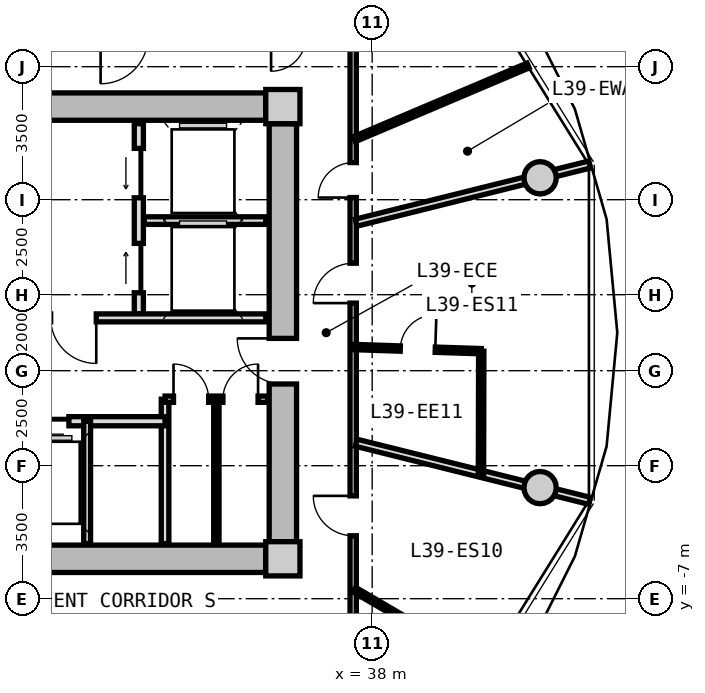
"""IFC4 building model, lengths in metres.
Left out: names, types, materials, properties, quantities, classifications, styles, units other than length and angle.
Written with IfcOpenShell. Run it as: python <this file> out.ifc"""

import sys

from ifc_helpers import new_model, si_unit, direction, frame, frame_2d, origin, origin_2d, place, context, subcontext, project, spatial, rectangle, circle, extrude, source, transform, mapped, element, fill, save


model = new_model("IFC4")
c1 = context("Model", 3, precision=1e-05, world=origin(), true_north=direction((0.0, 1.0)))
c2 = subcontext(c1, "Body", "Model", "MODEL_VIEW")
j1 = project(units=[si_unit("LENGTHUNIT", "METRE"), si_unit("PLANEANGLEUNIT", "RADIAN")], contexts=[c1])
p1 = place(None, origin())
s1 = spatial("IfcSite", under=j1, at=p1, CompositionType="ELEMENT")
p2 = place(p1, origin())
s2 = spatial("IfcBuilding", under=s1, at=p2, CompositionType="ELEMENT")
p3 = place(p2, frame((0.0, 0.0, 126.75)))
s3 = spatial("IfcBuildingStorey", under=s2, at=p3, CompositionType="ELEMENT", Elevation=126.75)
m1 = source(origin(), c2, "Body", "SweptSolid", [
    extrude(rectangle(XDim=0.9, YDim=0.9, at=origin_2d()), origin(), (0.0, 0.0, 1.0), 3.05),
])
for number, where, z_axis, x_axis in (
    (1, (35.65, -5.95, 0.0), (0.0, 0.0, 1.0), (1.0, 0.0, 0.0)),
    (2, (35.65, 5.95, 0.0), (0.0, 0.0, 1.0), (1.0, 0.0, 0.0)),
):
    element("IfcColumn", number, at=place(p3, frame(where, z_axis=z_axis, x_axis=x_axis)), inside=s3, PredefinedType="COLUMN", context=c2, shape_type="MappedRepresentation", body=[
        mapped(m1, transform((0.0, 0.0, 0.0), x_axis=(1.0, 0.0, 0.0), y_axis=(0.0, 1.0, 0.0), z_axis=(0.0, 0.0, 1.0), scale=1.0)),
    ])
m2 = source(origin(), c2, "Body", "SweptSolid", [
    extrude(rectangle(XDim=14.4, YDim=0.72, at=frame_2d((7.2, 0.0))), origin(), (0.0, 0.0, 1.0), 2.73),
])
for number, where, z_axis, x_axis in (
    (3, (20.8, 5.95, 0.0), (0.0, 0.0, 1.0), (1.0, 0.0, 0.0)),
    (4, (35.2, -5.95, 0.0), (0.0, 0.0, 1.0), (-1.0, 0.0, 0.0)),
):
    element("IfcWall", number, at=place(p3, frame(where, z_axis=z_axis, x_axis=x_axis)), inside=s3, PredefinedType="SHEAR", context=c2, shape_type="MappedRepresentation", body=[
        mapped(m2, transform((0.0, 0.0, 0.0), x_axis=(1.0, 0.0, 0.0), y_axis=(0.0, 1.0, 0.0), z_axis=(0.0, 0.0, 1.0), scale=1.0)),
    ])
m3 = source(origin(), c2, "Body", "SweptSolid", [
    extrude(rectangle(XDim=11.0, YDim=0.72, at=frame_2d((5.5, 0.0))), origin(), (0.0, 0.0, 1.0), 2.73),
])
p4 = place(p3, frame((35.65, 5.5, 0.0), z_axis=(0.0, 0.0, 1.0), x_axis=(0.0, -1.0, 0.0)))
e5 = element("IfcWall", 5, at=p4, inside=s3, PredefinedType="SHEAR", context=c2, shape_type="MappedRepresentation", body=[
    mapped(m3, transform((0.0, 0.0, 0.0), x_axis=(1.0, 0.0, 0.0), y_axis=(0.0, 1.0, 0.0), z_axis=(0.0, 0.0, 1.0), scale=1.0)),
])
p5 = place(p4, frame((5.65, 0.0, 0.0)))
e6 = element("IfcOpeningElement", 6, at=p5, cuts=e5, PredefinedType="OPENING", context=c2, shape_type="SweptSolid", body=[
    extrude(rectangle(XDim=1.2, YDim=2.15, at=frame_2d((0.6, 1.075))), frame((0.0, 0.37, 0.0), z_axis=(0.0, -1.0, 0.0), x_axis=(1.0, 0.0, 0.0)), (0.0, 0.0, 1.0), 0.74),
])
m4 = source(origin(), c2, "Body", "SweptSolid", [
    extrude(circle(Radius=0.425, at=origin_2d()), origin(), (0.0, 0.0, 1.0), 3.05),
])
for number, where, z_axis, x_axis in (
    (7, (42.419, 4.076, 0.0), (0.0, 0.0, 1.0), (1.0, 0.0, 0.0)),
    (8, (42.419, -4.076, 0.0), (0.0, 0.0, 1.0), (1.0, 0.0, 0.0)),
):
    element("IfcColumn", number, at=place(p3, frame(where, z_axis=z_axis, x_axis=x_axis)), inside=s3, PredefinedType="COLUMN", context=c2, shape_type="MappedRepresentation", body=[
        mapped(m4, transform((0.0, 0.0, 0.0), x_axis=(1.0, 0.0, 0.0), y_axis=(0.0, 1.0, 0.0), z_axis=(0.0, 0.0, 1.0), scale=1.0)),
    ])
m5 = source(origin(), c2, "Body", "SweptSolid", [
    extrude(rectangle(XDim=5.0, YDim=0.24, at=frame_2d((2.5, 0.0))), origin(), (0.0, 0.0, 1.0), 2.715),
])
p6 = place(p3, frame((31.86, 0.5, 0.0), z_axis=(0.0, 0.0, 1.0), x_axis=(0.0, 1.0, 0.0)))
e9 = element("IfcWall", 9, at=p6, inside=s3, PredefinedType="PARTITIONING", context=c2, shape_type="MappedRepresentation", body=[
    mapped(m5, transform((0.0, 0.0, 0.0), x_axis=(1.0, 0.0, 0.0), y_axis=(0.0, 1.0, 0.0), z_axis=(0.0, 0.0, 1.0), scale=1.0)),
])
p7 = place(p6, frame((3.05, 0.0, 0.0)))
e10 = element("IfcOpeningElement", 10, at=p7, cuts=e9, PredefinedType="OPENING", context=c2, shape_type="SweptSolid", body=[
    extrude(rectangle(XDim=1.3, YDim=2.2, at=frame_2d((0.65, 1.1))), frame((0.0, 0.13, 0.0), z_axis=(0.0, -1.0, 0.0), x_axis=(1.0, 0.0, 0.0)), (0.0, 0.0, 1.0), 0.26),
])
p8 = place(p6, frame((0.55, 0.0, 0.0)))
e11 = element("IfcOpeningElement", 11, at=p8, cuts=e9, PredefinedType="OPENING", context=c2, shape_type="SweptSolid", body=[
    extrude(rectangle(XDim=1.3, YDim=2.2, at=frame_2d((0.65, 1.1))), frame((0.0, 0.13, 0.0), z_axis=(0.0, -1.0, 0.0), x_axis=(1.0, 0.0, 0.0)), (0.0, 0.0, 1.0), 0.26),
])
m6 = source(origin(), c2, "Body", "SweptSolid", [
    extrude(rectangle(XDim=3.2, YDim=0.2, at=frame_2d((1.6, 0.0))), origin(), (0.0, 0.0, 1.0), 2.715),
])
p9 = place(p3, frame((32.0, 2.95, 0.0), z_axis=(0.0, 0.0, 1.0), x_axis=(1.0, 0.0, 0.0)))
e12 = element("IfcWall", 12, at=p9, inside=s3, PredefinedType="PARTITIONING", context=c2, shape_type="MappedRepresentation", body=[
    mapped(m6, transform((0.0, 0.0, 0.0), x_axis=(1.0, 0.0, 0.0), y_axis=(0.0, 1.0, 0.0), z_axis=(0.0, 0.0, 1.0), scale=1.0)),
])
m7 = source(origin(), c2, "Body", "SweptSolid", [
    extrude(rectangle(XDim=6.66, YDim=0.21, at=frame_2d((3.33, 0.0))), origin(), (0.0, 0.0, 1.0), 2.715),
])
p10 = place(p3, frame((28.54, 0.39, 0.0), z_axis=(0.0, 0.0, 1.0), x_axis=(1.0, 0.0, 0.0)))
e13 = element("IfcWall", 13, at=p10, inside=s3, PredefinedType="PARTITIONING", context=c2, shape_type="MappedRepresentation", body=[
    mapped(m7, transform((0.0, 0.0, 0.0), x_axis=(1.0, 0.0, 0.0), y_axis=(0.0, 1.0, 0.0), z_axis=(0.0, 0.0, 1.0), scale=1.0)),
])
p11 = place(p10, frame((1.0, 0.0, 0.0)))
e14 = element("IfcOpeningElement", 14, at=p11, cuts=e13, PredefinedType="OPENING", context=c2, shape_type="SweptSolid", body=[
    extrude(rectangle(XDim=1.2, YDim=2.15, at=frame_2d((0.6, 1.075))), frame((0.0, 0.115, 0.0), z_axis=(0.0, -1.0, 0.0), x_axis=(1.0, 0.0, 0.0)), (0.0, 0.0, 1.0), 0.23),
])
m8 = source(origin(), c2, "Body", "SweptSolid", [
    extrude(rectangle(XDim=3.8, YDim=0.2, at=frame_2d((1.9, 0.0))), origin(), (0.0, 0.0, 1.0), 2.715),
])
p12 = place(p3, frame((32.55, -5.55, 0.0), z_axis=(0.0, 0.0, 1.0), x_axis=(0.0, 1.0, 0.0)))
e15 = element("IfcWall", 15, at=p12, inside=s3, PredefinedType="PARTITIONING", context=c2, shape_type="MappedRepresentation", body=[
    mapped(m8, transform((0.0, 0.0, 0.0), x_axis=(1.0, 0.0, 0.0), y_axis=(0.0, 1.0, 0.0), z_axis=(0.0, 0.0, 1.0), scale=1.0)),
])
m9 = source(origin(), c2, "Body", "SweptSolid", [
    extrude(rectangle(XDim=4.13, YDim=0.24, at=frame_2d((2.065, 0.0))), origin(), (0.0, 0.0, 1.0), 2.715),
])
p13 = place(p3, frame((28.42, -2.33, 0.0), z_axis=(0.0, 0.0, 1.0), x_axis=(1.0, 0.0, 0.0)))
e16 = element("IfcWall", 16, at=p13, inside=s3, PredefinedType="PARTITIONING", context=c2, shape_type="MappedRepresentation", body=[
    mapped(m9, transform((0.0, 0.0, 0.0), x_axis=(1.0, 0.0, 0.0), y_axis=(0.0, 1.0, 0.0), z_axis=(0.0, 0.0, 1.0), scale=1.0)),
])
p14 = place(p13, frame((0.5, 0.0, 0.0)))
e17 = element("IfcOpeningElement", 17, at=p14, cuts=e16, PredefinedType="OPENING", context=c2, shape_type="SweptSolid", body=[
    extrude(rectangle(XDim=1.1, YDim=2.2, at=frame_2d((0.55, 1.1))), frame((0.0, 0.13, 0.0), z_axis=(0.0, -1.0, 0.0), x_axis=(1.0, 0.0, 0.0)), (0.0, 0.0, 1.0), 0.26),
])
m10 = source(origin(), c2, "Body", "SweptSolid", [
    extrude(rectangle(XDim=3.22, YDim=0.18, at=frame_2d((1.61, 0.0))), origin(), (0.0, 0.0, 1.0), 2.715),
])
p15 = place(p3, frame((30.5, -5.55, 0.0), z_axis=(0.0, 0.0, 1.0), x_axis=(0.0, 1.0, 0.0)))
e18 = element("IfcWall", 18, at=p15, inside=s3, PredefinedType="PARTITIONING", context=c2, shape_type="MappedRepresentation", body=[
    mapped(m10, transform((0.0, 0.0, 0.0), x_axis=(1.0, 0.0, 0.0), y_axis=(0.0, 1.0, 0.0), z_axis=(0.0, 0.0, 1.0), scale=1.0)),
])
m11 = source(origin(), c2, "Body", "SweptSolid", [
    extrude(rectangle(XDim=2.7, YDim=0.165, at=frame_2d((1.35, 0.0))), origin(), (0.0, 0.0, 1.0), 2.715),
])
p16 = place(p3, frame((32.55, -1.75, 0.0), z_axis=(0.0, 0.0, 1.0), x_axis=(1.0, 0.0, 0.0)))
e19 = element("IfcWall", 19, at=p16, inside=s3, PredefinedType="PARTITIONING", context=c2, shape_type="MappedRepresentation", body=[
    mapped(m11, transform((0.0, 0.0, 0.0), x_axis=(1.0, 0.0, 0.0), y_axis=(0.0, 1.0, 0.0), z_axis=(0.0, 0.0, 1.0), scale=1.0)),
])
p17 = place(p16, frame((0.222, 0.0, 0.0)))
e20 = element("IfcOpeningElement", 20, at=p17, cuts=e19, PredefinedType="OPENING", context=c2, shape_type="SweptSolid", body=[
    extrude(rectangle(XDim=0.925, YDim=2.1, at=frame_2d((0.462, 1.05))), frame((0.0, 0.093, 0.0), z_axis=(0.0, -1.0, 0.0), x_axis=(1.0, 0.0, 0.0)), (0.0, 0.0, 1.0), 0.185),
])
p18 = place(p16, frame((1.522, 0.0, 0.0)))
e21 = element("IfcOpeningElement", 21, at=p18, cuts=e19, PredefinedType="OPENING", context=c2, shape_type="SweptSolid", body=[
    extrude(rectangle(XDim=0.925, YDim=2.1, at=frame_2d((0.462, 1.05))), frame((0.0, 0.093, 0.0), z_axis=(0.0, -1.0, 0.0), x_axis=(1.0, 0.0, 0.0)), (0.0, 0.0, 1.0), 0.185),
])
m12 = source(origin(), c2, "Body", "SweptSolid", [
    extrude(rectangle(XDim=3.8, YDim=0.14, at=frame_2d((1.9, 0.0))), origin(), (0.0, 0.0, 1.0), 2.715),
])
p19 = place(p3, frame((33.9, -5.55, 0.0), z_axis=(0.0, 0.0, 1.0), x_axis=(0.0, 1.0, 0.0)))
e22 = element("IfcWall", 22, at=p19, inside=s3, PredefinedType="PARTITIONING", context=c2, shape_type="MappedRepresentation", body=[
    mapped(m12, transform((0.0, 0.0, 0.0), x_axis=(1.0, 0.0, 0.0), y_axis=(0.0, 1.0, 0.0), z_axis=(0.0, 0.0, 1.0), scale=1.0)),
])
m13 = source(origin(), c2, "Body", "SweptSolid", [
    extrude(rectangle(XDim=15.6, YDim=0.165, at=frame_2d((7.8, 0.0))), origin(), (0.0, 0.0, 1.0), 2.715),
])
p20 = place(p3, frame((37.5, 7.8, 0.0), z_axis=(0.0, 0.0, 1.0), x_axis=(0.0, -1.0, 0.0)))
e23 = element("IfcWall", 23, at=p20, inside=s3, PredefinedType="PARTITIONING", context=c2, shape_type="MappedRepresentation", body=[
    mapped(m13, transform((0.0, 0.0, 0.0), x_axis=(1.0, 0.0, 0.0), y_axis=(0.0, 1.0, 0.0), z_axis=(0.0, 0.0, 1.0), scale=1.0)),
])
p21 = place(p20, frame((12.094, 0.0, 0.0)))
e24 = element("IfcOpeningElement", 24, at=p21, cuts=e23, PredefinedType="OPENING", context=c2, shape_type="SweptSolid", body=[
    extrude(rectangle(XDim=1.05, YDim=2.15, at=frame_2d((0.525, 1.075))), frame((0.0, 0.093, 0.0), z_axis=(0.0, -1.0, 0.0), x_axis=(1.0, 0.0, 0.0)), (0.0, 0.0, 1.0), 0.185),
])
p22 = place(p20, frame((5.971, 0.0, 0.0)))
e25 = element("IfcOpeningElement", 25, at=p22, cuts=e23, PredefinedType="OPENING", context=c2, shape_type="SweptSolid", body=[
    extrude(rectangle(XDim=1.05, YDim=2.15, at=frame_2d((0.525, 1.075))), frame((0.0, 0.093, 0.0), z_axis=(0.0, -1.0, 0.0), x_axis=(1.0, 0.0, 0.0)), (0.0, 0.0, 1.0), 0.185),
])
p23 = place(p20, frame((3.324, 0.0, 0.0)))
e26 = element("IfcOpeningElement", 26, at=p23, cuts=e23, PredefinedType="OPENING", context=c2, shape_type="SweptSolid", body=[
    extrude(rectangle(XDim=0.92, YDim=2.1, at=frame_2d((0.46, 1.05))), frame((0.0, 0.093, 0.0), z_axis=(0.0, -1.0, 0.0), x_axis=(1.0, 0.0, 0.0)), (0.0, 0.0, 1.0), 0.185),
])
m14 = source(origin(), c2, "Body", "SweptSolid", [
    extrude(rectangle(XDim=6.331, YDim=0.19, at=frame_2d((3.165, 0.0))), origin(), (0.0, 0.0, 1.0), 2.215),
])
p24 = place(p3, frame((37.58, -2.896, 0.0), z_axis=(0.0, 0.0, 1.0), x_axis=(0.97036440661, -0.241646267062, 0.0)))
e27 = element("IfcWall", 27, at=p24, inside=s3, PredefinedType="PARTITIONING", context=c2, shape_type="MappedRepresentation", body=[
    mapped(m14, transform((0.0, 0.0, 0.0), x_axis=(1.0, 0.0, 0.0), y_axis=(0.0, 1.0, 0.0), z_axis=(0.0, 0.0, 1.0), scale=1.0)),
])
m15 = source(origin(), c2, "Body", "SweptSolid", [
    extrude(rectangle(XDim=2.172, YDim=0.14, at=frame_2d((1.086, 0.0))), origin(), (0.0, 0.0, 1.0), 2.715),
])
p25 = place(p3, frame((37.53, -6.762, 0.0), z_axis=(0.0, 0.0, 1.0), x_axis=(0.863562702562, -0.504241468688, 0.0)))
e28 = element("IfcWall", 28, at=p25, inside=s3, PredefinedType="PARTITIONING", context=c2, shape_type="MappedRepresentation", body=[
    mapped(m15, transform((0.0, 0.0, 0.0), x_axis=(1.0, 0.0, 0.0), y_axis=(0.0, 1.0, 0.0), z_axis=(0.0, 0.0, 1.0), scale=1.0)),
])
p26 = place(p3, frame((37.58, 2.896, 0.0), z_axis=(0.0, 0.0, 1.0), x_axis=(0.97036440661, 0.241646267062, 0.0)))
e29 = element("IfcWall", 29, at=p26, inside=s3, PredefinedType="PARTITIONING", context=c2, shape_type="MappedRepresentation", body=[
    mapped(m14, transform((0.0, 0.0, 0.0), x_axis=(1.0, 0.0, 0.0), y_axis=(0.0, 1.0, 0.0), z_axis=(0.0, 0.0, 1.0), scale=1.0)),
])
m16 = source(origin(), c2, "Body", "SweptSolid", [
    extrude(rectangle(XDim=3.342, YDim=0.14, at=frame_2d((1.671, 0.0))), origin(), (0.0, 0.0, 1.0), 2.715),
])
p27 = place(p3, frame((37.53, -0.378, 0.0), z_axis=(0.0, 0.0, 1.0), x_axis=(0.999468967034, -0.032585026264, 0.0)))
e30 = element("IfcWall", 30, at=p27, inside=s3, PredefinedType="PARTITIONING", context=c2, shape_type="MappedRepresentation", body=[
    mapped(m16, transform((0.0, 0.0, 0.0), x_axis=(1.0, 0.0, 0.0), y_axis=(0.0, 1.0, 0.0), z_axis=(0.0, 0.0, 1.0), scale=1.0)),
])
p28 = place(p27, frame((1.211, 0.0, 0.0)))
e31 = element("IfcOpeningElement", 31, at=p28, cuts=e30, PredefinedType="OPENING", context=c2, shape_type="SweptSolid", body=[
    extrude(rectangle(XDim=0.92, YDim=2.1, at=frame_2d((0.46, 1.05))), frame((0.0, 0.08, 0.0), z_axis=(0.0, -1.0, 0.0), x_axis=(1.0, 0.0, 0.0)), (0.0, 0.0, 1.0), 0.16),
])
m17 = source(origin(), c2, "Body", "SweptSolid", [
    extrude(rectangle(XDim=3.247, YDim=0.14, at=frame_2d((1.624, 0.0))), origin(), (0.0, 0.0, 1.0), 2.715),
])
p29 = place(p3, frame((40.87, -0.487, 0.0), z_axis=(0.0, 0.0, 1.0), x_axis=(-0.002105100215, -0.999997784274, 0.0)))
e32 = element("IfcWall", 32, at=p29, inside=s3, PredefinedType="PARTITIONING", context=c2, shape_type="MappedRepresentation", body=[
    mapped(m17, transform((0.0, 0.0, 0.0), x_axis=(1.0, 0.0, 0.0), y_axis=(0.0, 1.0, 0.0), z_axis=(0.0, 0.0, 1.0), scale=1.0)),
])
m18 = source(origin(), c2, "Body", "SweptSolid", [
    extrude(rectangle(XDim=4.968, YDim=0.14, at=frame_2d((2.484, 0.0))), origin(), (0.0, 0.0, 1.0), 2.715),
])
p30 = place(p3, frame((37.53, 5.092, 0.0), z_axis=(0.0, 0.0, 1.0), x_axis=(0.920595165864, 0.39051829738, 0.0)))
e33 = element("IfcWall", 33, at=p30, inside=s3, PredefinedType="PARTITIONING", context=c2, shape_type="MappedRepresentation", body=[
    mapped(m18, transform((0.0, 0.0, 0.0), x_axis=(1.0, 0.0, 0.0), y_axis=(0.0, 1.0, 0.0), z_axis=(0.0, 0.0, 1.0), scale=1.0)),
])
m19 = source(origin(), c2, "Body", "SweptSolid", [
    extrude(rectangle(XDim=1.3, YDim=2.2, at=frame_2d((0.65, 1.1))), frame((0.0, 0.025, 0.0), z_axis=(0.0, -1.0, 0.0), x_axis=(1.0, 0.0, 0.0)), (0.0, 0.0, 1.0), 0.05),
])
p31 = place(p7, origin())
e34 = element("IfcDoor", 34, at=p31, inside=s3, OperationType="SLIDING_TO_LEFT", PredefinedType="DOOR", context=c2, shape_type="MappedRepresentation", body=[
    mapped(m19, transform((0.0, 0.0, 0.0), x_axis=(1.0, 0.0, 0.0), y_axis=(0.0, 1.0, 0.0), z_axis=(0.0, 0.0, 1.0), scale=1.0)),
])
fill(e10, e34)
p32 = place(p8, origin())
e35 = element("IfcDoor", 35, at=p32, inside=s3, OperationType="SLIDING_TO_RIGHT", PredefinedType="DOOR", context=c2, shape_type="MappedRepresentation", body=[
    mapped(m19, transform((0.0, 0.0, 0.0), x_axis=(1.0, 0.0, 0.0), y_axis=(0.0, 1.0, 0.0), z_axis=(0.0, 0.0, 1.0), scale=1.0)),
])
fill(e11, e35)
m20 = source(origin(), c2, "Body", "SweptSolid", [
    extrude(rectangle(XDim=1.2, YDim=2.15, at=frame_2d((0.6, 1.075))), frame((0.0, 0.025, 0.0), z_axis=(0.0, -1.0, 0.0), x_axis=(1.0, 0.0, 0.0)), (0.0, 0.0, 1.0), 0.05),
])
p33 = place(p11, frame((1.2, 0.0, 0.0), z_axis=(0.0, 0.0, 1.0), x_axis=(-1.0, 0.0, 0.0)))
e36 = element("IfcDoor", 36, at=p33, inside=s3, OperationType="SINGLE_SWING_LEFT", PredefinedType="DOOR", context=c2, shape_type="MappedRepresentation", body=[
    mapped(m20, transform((0.0, 0.0, 0.0), x_axis=(1.0, 0.0, 0.0), y_axis=(0.0, 1.0, 0.0), z_axis=(0.0, 0.0, 1.0), scale=1.0)),
])
fill(e14, e36)
p34 = place(p5, frame((1.2, 0.0, 0.0), z_axis=(0.0, 0.0, 1.0), x_axis=(-1.0, 0.0, 0.0)))
e37 = element("IfcDoor", 37, at=p34, inside=s3, OperationType="SINGLE_SWING_RIGHT", PredefinedType="DOOR", context=c2, shape_type="MappedRepresentation", body=[
    mapped(m20, transform((0.0, 0.0, 0.0), x_axis=(1.0, 0.0, 0.0), y_axis=(0.0, 1.0, 0.0), z_axis=(0.0, 0.0, 1.0), scale=1.0)),
])
fill(e6, e37)
m21 = source(origin(), c2, "Body", "SweptSolid", [
    extrude(rectangle(XDim=1.1, YDim=2.2, at=frame_2d((0.55, 1.1))), frame((0.0, 0.025, 0.0), z_axis=(0.0, -1.0, 0.0), x_axis=(1.0, 0.0, 0.0)), (0.0, 0.0, 1.0), 0.05),
])
p35 = place(p14, frame((1.1, 0.0, 0.0), z_axis=(0.0, 0.0, 1.0), x_axis=(-1.0, 0.0, 0.0)))
e38 = element("IfcDoor", 38, at=p35, inside=s3, OperationType="SLIDING_TO_LEFT", PredefinedType="DOOR", context=c2, shape_type="MappedRepresentation", body=[
    mapped(m21, transform((0.0, 0.0, 0.0), x_axis=(1.0, 0.0, 0.0), y_axis=(0.0, 1.0, 0.0), z_axis=(0.0, 0.0, 1.0), scale=1.0)),
])
fill(e17, e38)
m22 = source(origin(), c2, "Body", "SweptSolid", [
    extrude(rectangle(XDim=0.925, YDim=2.1, at=frame_2d((0.462, 1.05))), frame((0.0, 0.025, 0.0), z_axis=(0.0, -1.0, 0.0), x_axis=(1.0, 0.0, 0.0)), (0.0, 0.0, 1.0), 0.05),
])
p36 = place(p17, origin())
e39 = element("IfcDoor", 39, at=p36, inside=s3, OperationType="SINGLE_SWING_LEFT", PredefinedType="DOOR", context=c2, shape_type="MappedRepresentation", body=[
    mapped(m22, transform((0.0, 0.0, 0.0), x_axis=(1.0, 0.0, 0.0), y_axis=(0.0, 1.0, 0.0), z_axis=(0.0, 0.0, 1.0), scale=1.0)),
])
fill(e20, e39)
p37 = place(p18, origin())
e40 = element("IfcDoor", 40, at=p37, inside=s3, OperationType="SINGLE_SWING_RIGHT", PredefinedType="DOOR", context=c2, shape_type="MappedRepresentation", body=[
    mapped(m22, transform((0.0, 0.0, 0.0), x_axis=(1.0, 0.0, 0.0), y_axis=(0.0, 1.0, 0.0), z_axis=(0.0, 0.0, 1.0), scale=1.0)),
])
fill(e21, e40)
m23 = source(origin(), c2, "Body", "SweptSolid", [
    extrude(rectangle(XDim=1.05, YDim=2.15, at=frame_2d((0.525, 1.075))), frame((0.0, 0.025, 0.0), z_axis=(0.0, -1.0, 0.0), x_axis=(1.0, 0.0, 0.0)), (0.0, 0.0, 1.0), 0.05),
])
p38 = place(p21, frame((1.05, 0.0, 0.0), z_axis=(0.0, 0.0, 1.0), x_axis=(-1.0, 0.0, 0.0)))
e41 = element("IfcDoor", 41, at=p38, inside=s3, OperationType="SINGLE_SWING_RIGHT", PredefinedType="DOOR", context=c2, shape_type="MappedRepresentation", body=[
    mapped(m23, transform((0.0, 0.0, 0.0), x_axis=(1.0, 0.0, 0.0), y_axis=(0.0, 1.0, 0.0), z_axis=(0.0, 0.0, 1.0), scale=1.0)),
])
fill(e24, e41)
p39 = place(p22, frame((1.05, 0.0, 0.0), z_axis=(0.0, 0.0, 1.0), x_axis=(-1.0, 0.0, 0.0)))
e42 = element("IfcDoor", 42, at=p39, inside=s3, OperationType="SINGLE_SWING_LEFT", PredefinedType="DOOR", context=c2, shape_type="MappedRepresentation", body=[
    mapped(m23, transform((0.0, 0.0, 0.0), x_axis=(1.0, 0.0, 0.0), y_axis=(0.0, 1.0, 0.0), z_axis=(0.0, 0.0, 1.0), scale=1.0)),
])
fill(e25, e42)
m24 = source(origin(), c2, "Body", "SweptSolid", [
    extrude(rectangle(XDim=0.92, YDim=2.1, at=frame_2d((0.46, 1.05))), frame((0.0, 0.025, 0.0), z_axis=(0.0, -1.0, 0.0), x_axis=(1.0, 0.0, 0.0)), (0.0, 0.0, 1.0), 0.05),
])
p40 = place(p28, origin())
e43 = element("IfcDoor", 43, at=p40, inside=s3, OperationType="SINGLE_SWING_RIGHT", PredefinedType="DOOR", context=c2, shape_type="MappedRepresentation", body=[
    mapped(m24, transform((0.0, 0.0, 0.0), x_axis=(1.0, 0.0, 0.0), y_axis=(0.0, 1.0, 0.0), z_axis=(0.0, 0.0, 1.0), scale=1.0)),
])
fill(e31, e43)
p41 = place(p23, frame((0.92, 0.0, 0.0), z_axis=(0.0, 0.0, 1.0), x_axis=(-1.0, 0.0, 0.0)))
e44 = element("IfcDoor", 44, at=p41, inside=s3, OperationType="SINGLE_SWING_LEFT", PredefinedType="DOOR", context=c2, shape_type="MappedRepresentation", body=[
    mapped(m24, transform((0.0, 0.0, 0.0), x_axis=(1.0, 0.0, 0.0), y_axis=(0.0, 1.0, 0.0), z_axis=(0.0, 0.0, 1.0), scale=1.0)),
])
fill(e26, e44)
save(model, sys.argv[1])
